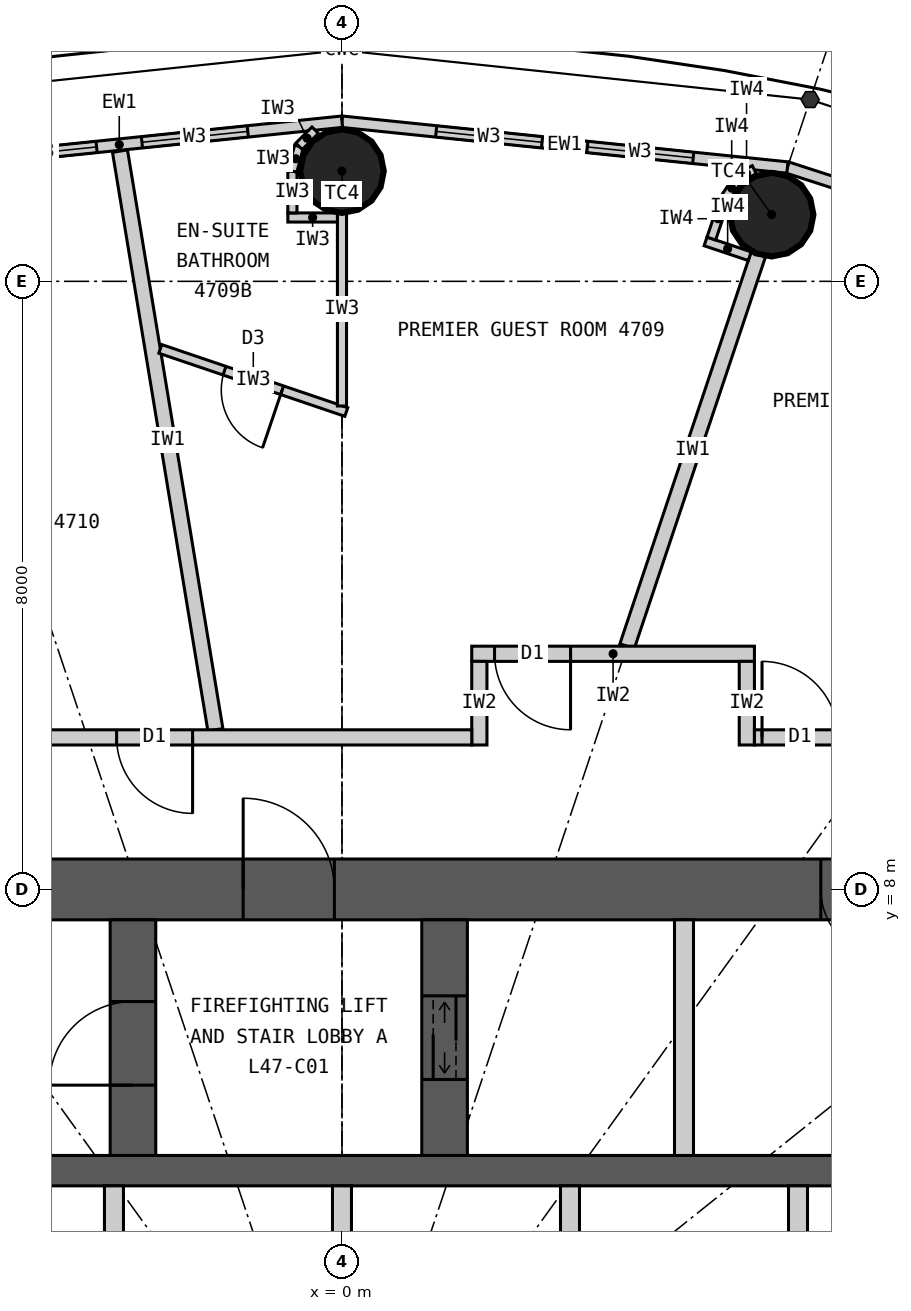
"""IFC4 building model, lengths in metres.
Left out: names, types, materials, properties, quantities, classifications, styles, units other than length and angle.
Written with IfcOpenShell. Run it as: python <this file> out.ifc"""

import sys

from ifc_helpers import new_model, si_unit, direction, frame, frame_2d, origin, origin_2d, place, context, subcontext, project, spatial, rectangle, circle, extrude, element, fill, save


model = new_model("IFC4")
c1 = context("Model", 3, precision=1e-05, world=origin(), true_north=direction((0.0, 1.0)))
c2 = subcontext(c1, "Body", "Model", "MODEL_VIEW")
j1 = project(units=[si_unit("LENGTHUNIT", "METRE"), si_unit("PLANEANGLEUNIT", "RADIAN")], contexts=[c1])
p1 = place(None, origin())
s1 = spatial("IfcSite", under=j1, at=p1, CompositionType="ELEMENT")
p2 = place(p1, origin())
s2 = spatial("IfcBuilding", under=s1, at=p2, CompositionType="ELEMENT")
p3 = place(p2, frame((0.0, 0.0, 176.4)))
s3 = spatial("IfcBuildingStorey", under=s2, at=p3, CompositionType="ELEMENT", Elevation=176.4)
for number, where, z_axis, x_axis in (
    (1, (5.653, 16.877, 0.0), (0.0, 0.0, 1.0), (1.0, 0.0, 0.0)),
    (2, (0.0, 17.45, 0.0), (0.0, 0.0, 1.0), (1.0, 0.0, 0.0)),
):
    element("IfcColumn", number, at=place(p3, frame(where, z_axis=z_axis, x_axis=x_axis)), inside=s3, PredefinedType="COLUMN", context=c2, shape_type="SweptSolid", body=[
        extrude(circle(Radius=0.55, at=origin_2d()), origin(), (0.0, 0.0, 1.0), 3.3),
    ])
p4 = place(p3, frame((-12.4, 8.0, 0.0), z_axis=(0.0, 0.0, 1.0), x_axis=(1.0, 0.0, 0.0)))
e3 = element("IfcWall", 3, at=p4, inside=s3, PredefinedType="SHEAR", context=c2, shape_type="SweptSolid", body=[
    extrude(rectangle(XDim=24.8, YDim=0.8, at=frame_2d((12.4, 0.0))), origin(), (0.0, 0.0, 1.0), 3.3),
])
p5 = place(p4, frame((11.1, 0.0, 0.0)))
e4 = element("IfcOpeningElement", 4, at=p5, cuts=e3, PredefinedType="OPENING", context=c2, shape_type="SweptSolid", body=[
    extrude(rectangle(XDim=1.2, YDim=2.2, at=frame_2d((0.6, 1.1))), frame((0.0, 0.41, 0.0), z_axis=(0.0, -1.0, 0.0), x_axis=(1.0, 0.0, 0.0)), (0.0, 0.0, 1.0), 0.82),
])
p6 = place(p4, frame((18.7, 0.0, 0.0)))
e5 = element("IfcOpeningElement", 5, at=p6, cuts=e3, PredefinedType="OPENING", context=c2, shape_type="SweptSolid", body=[
    extrude(rectangle(XDim=0.9, YDim=2.2, at=frame_2d((0.45, 1.1))), frame((0.0, 0.41, 0.0), z_axis=(0.0, -1.0, 0.0), x_axis=(1.0, 0.0, 0.0)), (0.0, 0.0, 1.0), 0.82),
])
p7 = place(p3, frame((-11.6, 4.3, 0.0), z_axis=(0.0, 0.0, 1.0), x_axis=(1.0, 0.0, 0.0)))
e6 = element("IfcWall", 6, at=p7, inside=s3, PredefinedType="SHEAR", context=c2, shape_type="SweptSolid", body=[
    extrude(rectangle(XDim=23.2, YDim=0.4, at=frame_2d((11.6, 0.0))), origin(), (0.0, 0.0, 1.0), 3.3),
])
p8 = place(p3, frame((-2.75, 4.5, 0.0), z_axis=(0.0, 0.0, 1.0), x_axis=(0.0, 1.0, 0.0)))
e7 = element("IfcWall", 7, at=p8, inside=s3, PredefinedType="SHEAR", context=c2, shape_type="SweptSolid", body=[
    extrude(rectangle(XDim=3.1, YDim=0.6, at=frame_2d((1.55, 0.0))), origin(), (0.0, 0.0, 1.0), 3.3),
])
p9 = place(p8, frame((0.925, 0.0, 0.0)))
e8 = element("IfcOpeningElement", 8, at=p9, cuts=e7, PredefinedType="OPENING", context=c2, shape_type="SweptSolid", body=[
    extrude(rectangle(XDim=1.1, YDim=2.2, at=frame_2d((0.55, 1.1))), frame((0.0, 0.31, 0.0), z_axis=(0.0, -1.0, 0.0), x_axis=(1.0, 0.0, 0.0)), (0.0, 0.0, 1.0), 0.62),
])
p10 = place(p3, frame((1.35, 4.5, 0.0), z_axis=(0.0, 0.0, 1.0), x_axis=(0.0, 1.0, 0.0)))
e9 = element("IfcWall", 9, at=p10, inside=s3, PredefinedType="SHEAR", context=c2, shape_type="SweptSolid", body=[
    extrude(rectangle(XDim=3.1, YDim=0.6, at=frame_2d((1.55, 0.0))), origin(), (0.0, 0.0, 1.0), 3.3),
])
p11 = place(p10, frame((1.0, 0.0, 0.0)))
e10 = element("IfcOpeningElement", 10, at=p11, cuts=e9, PredefinedType="OPENING", context=c2, shape_type="SweptSolid", body=[
    extrude(rectangle(XDim=1.1, YDim=2.2, at=frame_2d((0.55, 1.1))), frame((0.0, 0.31, 0.0), z_axis=(0.0, -1.0, 0.0), x_axis=(1.0, 0.0, 0.0)), (0.0, 0.0, 1.0), 0.62),
])
p12 = place(p3, frame((4.5, 4.5, 0.0), z_axis=(0.0, 0.0, 1.0), x_axis=(0.0, 1.0, 0.0)))
e11 = element("IfcWall", 11, at=p12, inside=s3, PredefinedType="PARTITIONING", context=c2, shape_type="SweptSolid", body=[
    extrude(rectangle(XDim=3.1, YDim=0.25, at=frame_2d((1.55, 0.0))), origin(), (0.0, 0.0, 1.0), 3.3),
])
for number, where, z_axis, x_axis in (
    (12, (-3.0, 1.75, 0.0), (0.0, 0.0, 1.0), (0.0, 1.0, 0.0)),
    (13, (0.0, 1.75, 0.0), (0.0, 0.0, 1.0), (0.0, 1.0, 0.0)),
    (14, (3.0, 1.75, 0.0), (0.0, 0.0, 1.0), (0.0, 1.0, 0.0)),
    (15, (6.0, 1.75, 0.0), (0.0, 0.0, 1.0), (0.0, 1.0, 0.0)),
):
    element("IfcWall", number, at=place(p3, frame(where, z_axis=z_axis, x_axis=x_axis)), inside=s3, PredefinedType="PARTITIONING", context=c2, shape_type="SweptSolid", body=[
        extrude(rectangle(XDim=2.35, YDim=0.25, at=frame_2d((1.175, 0.0))), origin(), (0.0, 0.0, 1.0), 3.3),
    ])
p13 = place(p3, frame((11.346, 15.722, 0.0), z_axis=(0.0, 0.0, 1.0), x_axis=(-0.951432482129, 0.307857486429, 0.0)))
e16 = element("IfcWall", 16, at=p13, inside=s3, PredefinedType="ELEMENTEDWALL", context=c2, shape_type="SweptSolid", body=[
    extrude(rectangle(XDim=5.766, YDim=0.15, at=frame_2d((2.883, 0.0))), origin(), (0.0, 0.0, 1.0), 3.12),
])
p14 = place(p13, frame((1.183, 0.0, 0.9)))
e17 = element("IfcOpeningElement", 17, at=p14, cuts=e16, PredefinedType="OPENING", context=c2, shape_type="SweptSolid", body=[
    extrude(rectangle(XDim=1.4, YDim=1.9, at=frame_2d((0.7, 0.95))), frame((0.0, 0.085, 0.0), z_axis=(0.0, -1.0, 0.0), x_axis=(1.0, 0.0, 0.0)), (0.0, 0.0, 1.0), 0.17),
])
p15 = place(p13, frame((3.183, 0.0, 0.9)))
e18 = element("IfcOpeningElement", 18, at=p15, cuts=e16, PredefinedType="OPENING", context=c2, shape_type="SweptSolid", body=[
    extrude(rectangle(XDim=1.4, YDim=1.9, at=frame_2d((0.7, 0.95))), frame((0.0, 0.085, 0.0), z_axis=(0.0, -1.0, 0.0), x_axis=(1.0, 0.0, 0.0)), (0.0, 0.0, 1.0), 0.17),
])
p16 = place(p3, frame((5.86, 17.497, 0.0), z_axis=(0.0, 0.0, 1.0), x_axis=(-0.994751738032, 0.102318032045, 0.0)))
e19 = element("IfcWall", 19, at=p16, inside=s3, PredefinedType="ELEMENTEDWALL", context=c2, shape_type="SweptSolid", body=[
    extrude(rectangle(XDim=5.891, YDim=0.15, at=frame_2d((2.946, 0.0))), origin(), (0.0, 0.0, 1.0), 3.12),
])
p17 = place(p16, frame((1.246, 0.0, 0.9)))
e20 = element("IfcOpeningElement", 20, at=p17, cuts=e19, PredefinedType="OPENING", context=c2, shape_type="SweptSolid", body=[
    extrude(rectangle(XDim=1.4, YDim=1.9, at=frame_2d((0.7, 0.95))), frame((0.0, 0.085, 0.0), z_axis=(0.0, -1.0, 0.0), x_axis=(1.0, 0.0, 0.0)), (0.0, 0.0, 1.0), 0.17),
])
p18 = place(p16, frame((3.246, 0.0, 0.9)))
e21 = element("IfcOpeningElement", 21, at=p18, cuts=e19, PredefinedType="OPENING", context=c2, shape_type="SweptSolid", body=[
    extrude(rectangle(XDim=1.4, YDim=1.9, at=frame_2d((0.7, 0.95))), frame((0.0, 0.085, 0.0), z_axis=(0.0, -1.0, 0.0), x_axis=(1.0, 0.0, 0.0)), (0.0, 0.0, 1.0), 0.17),
])
p19 = place(p3, frame((0.0, 18.1, 0.0), z_axis=(0.0, 0.0, 1.0), x_axis=(-0.994751738032, -0.102318032045, 0.0)))
e22 = element("IfcWall", 22, at=p19, inside=s3, PredefinedType="ELEMENTEDWALL", context=c2, shape_type="SweptSolid", body=[
    extrude(rectangle(XDim=5.891, YDim=0.15, at=frame_2d((2.946, 0.0))), origin(), (0.0, 0.0, 1.0), 3.12),
])
p20 = place(p19, frame((1.246, 0.0, 0.9)))
e23 = element("IfcOpeningElement", 23, at=p20, cuts=e22, PredefinedType="OPENING", context=c2, shape_type="SweptSolid", body=[
    extrude(rectangle(XDim=1.4, YDim=1.9, at=frame_2d((0.7, 0.95))), frame((0.0, 0.085, 0.0), z_axis=(0.0, -1.0, 0.0), x_axis=(1.0, 0.0, 0.0)), (0.0, 0.0, 1.0), 0.17),
])
p21 = place(p19, frame((3.246, 0.0, 0.9)))
e24 = element("IfcOpeningElement", 24, at=p21, cuts=e22, PredefinedType="OPENING", context=c2, shape_type="SweptSolid", body=[
    extrude(rectangle(XDim=1.4, YDim=1.9, at=frame_2d((0.7, 0.95))), frame((0.0, 0.085, 0.0), z_axis=(0.0, -1.0, 0.0), x_axis=(1.0, 0.0, 0.0)), (0.0, 0.0, 1.0), 0.17),
])
p22 = place(p3, frame((3.751, 11.2, 0.0), z_axis=(0.0, 0.0, 1.0), x_axis=(0.317614803807, 0.948219824937, 0.0)))
e25 = element("IfcWall", 25, at=p22, inside=s3, PredefinedType="PARTITIONING", context=c2, shape_type="SweptSolid", body=[
    extrude(rectangle(XDim=5.438, YDim=0.2, at=frame_2d((2.719, 0.0))), origin(), (0.0, 0.0, 1.0), 2.42),
])
p23 = place(p3, frame((-1.666, 10.1, 0.0), z_axis=(0.0, 0.0, 1.0), x_axis=(-0.162669562982, 0.986680603478, 0.0)))
e26 = element("IfcWall", 26, at=p23, inside=s3, PredefinedType="PARTITIONING", context=c2, shape_type="SweptSolid", body=[
    extrude(rectangle(XDim=7.716, YDim=0.2, at=frame_2d((3.858, 0.0))), origin(), (0.0, 0.0, 1.0), 3.12),
])
p24 = place(p3, frame((1.708, 11.1, 0.0), z_axis=(0.0, 0.0, 1.0), x_axis=(1.0, 0.0, 0.0)))
e27 = element("IfcWall", 27, at=p24, inside=s3, PredefinedType="PARTITIONING", context=c2, shape_type="SweptSolid", body=[
    extrude(rectangle(XDim=3.719, YDim=0.2, at=frame_2d((1.86, 0.0))), origin(), (0.0, 0.0, 1.0), 3.12),
])
p25 = place(p24, frame((0.3, 0.0, 0.0)))
e28 = element("IfcOpeningElement", 28, at=p25, cuts=e27, PredefinedType="OPENING", context=c2, shape_type="SweptSolid", body=[
    extrude(rectangle(XDim=1.0, YDim=2.2, at=frame_2d((0.5, 1.1))), frame((0.0, 0.11, 0.0), z_axis=(0.0, -1.0, 0.0), x_axis=(1.0, 0.0, 0.0)), (0.0, 0.0, 1.0), 0.22),
])
for number, where, z_axis, x_axis in (
    (29, (1.807, 9.9, 0.0), (0.0, 0.0, 1.0), (0.0, 1.0, 0.0)),
    (30, (5.327, 9.9, 0.0), (0.0, 0.0, 1.0), (0.0, 1.0, 0.0)),
):
    element("IfcWall", number, at=place(p3, frame(where, z_axis=z_axis, x_axis=x_axis)), inside=s3, PredefinedType="PARTITIONING", context=c2, shape_type="SweptSolid", body=[
        extrude(rectangle(XDim=1.1, YDim=0.2, at=frame_2d((0.55, 0.0))), origin(), (0.0, 0.0, 1.0), 3.12),
    ])
p26 = place(p3, frame((-2.39, 15.111, 0.0), z_axis=(0.0, 0.0, 1.0), x_axis=(0.946949953534, -0.321381059649, 0.0)))
e31 = element("IfcWall", 31, at=p26, inside=s3, PredefinedType="PARTITIONING", context=c2, shape_type="SweptSolid", body=[
    extrude(rectangle(XDim=2.584, YDim=0.12, at=frame_2d((1.292, 0.0))), origin(), (0.0, 0.0, 1.0), 3.12),
])
p27 = place(p26, frame((0.892, 0.0, 0.0)))
e32 = element("IfcOpeningElement", 32, at=p27, cuts=e31, PredefinedType="OPENING", context=c2, shape_type="SweptSolid", body=[
    extrude(rectangle(XDim=0.8, YDim=2.1, at=frame_2d((0.4, 1.05))), frame((0.0, 0.07, 0.0), z_axis=(0.0, -1.0, 0.0), x_axis=(1.0, 0.0, 0.0)), (0.0, 0.0, 1.0), 0.14),
])
p28 = place(p3, frame((0.0, 14.36, 0.0), z_axis=(0.0, 0.0, 1.0), x_axis=(0.0, 1.0, 0.0)))
e33 = element("IfcWall", 33, at=p28, inside=s3, PredefinedType="PARTITIONING", context=c2, shape_type="SweptSolid", body=[
    extrude(rectangle(XDim=2.54, YDim=0.12, at=frame_2d((1.27, 0.0))), origin(), (0.0, 0.0, 1.0), 2.42),
])
p29 = place(p3, frame((-0.06, 16.84, 0.0), z_axis=(0.0, 0.0, 1.0), x_axis=(-1.0, 0.0, 0.0)))
e34 = element("IfcWall", 34, at=p29, inside=s3, PredefinedType="PARTITIONING", context=c2, shape_type="SweptSolid", body=[
    extrude(rectangle(XDim=0.652, YDim=0.12, at=frame_2d((0.326, 0.0))), origin(), (0.0, 0.0, 1.0), 3.12),
])
p30 = place(p3, frame((-0.652, 16.9, 0.0), z_axis=(0.0, 0.0, 1.0), x_axis=(0.0, 1.0, 0.0)))
e35 = element("IfcWall", 35, at=p30, inside=s3, PredefinedType="PARTITIONING", context=c2, shape_type="SweptSolid", body=[
    extrude(rectangle(XDim=0.55, YDim=0.12, at=frame_2d((0.275, 0.0))), origin(), (0.0, 0.0, 1.0), 3.12),
])
p31 = place(p3, frame((-0.652, 17.45, 0.0), z_axis=(0.0, 0.0, 1.0), x_axis=(0.258832454679, 0.965922233104, 0.0)))
e36 = element("IfcWall", 36, at=p31, inside=s3, PredefinedType="PARTITIONING", context=c2, shape_type="SweptSolid", body=[
    extrude(rectangle(XDim=0.338, YDim=0.12, at=frame_2d((0.169, 0.0))), origin(), (0.0, 0.0, 1.0), 3.12),
])
p32 = place(p3, frame((-0.565, 17.776, 0.0), z_axis=(0.0, 0.0, 1.0), x_axis=(0.707106781187, 0.707106781187, 0.0)))
e37 = element("IfcWall", 37, at=p32, inside=s3, PredefinedType="PARTITIONING", context=c2, shape_type="SweptSolid", body=[
    extrude(rectangle(XDim=0.301, YDim=0.12, at=frame_2d((0.15, 0.0))), origin(), (0.0, 0.0, 1.0), 3.12),
])
p33 = place(p3, frame((-14.1, 10.0, 0.0), z_axis=(0.0, 0.0, 1.0), x_axis=(1.0, 0.0, 0.0)))
e38 = element("IfcWall", 38, at=p33, inside=s3, PredefinedType="PARTITIONING", context=c2, shape_type="SweptSolid", body=[
    extrude(rectangle(XDim=15.808, YDim=0.2, at=frame_2d((7.904, 0.0))), origin(), (0.0, 0.0, 1.0), 3.12),
])
p34 = place(p33, frame((11.135, 0.0, 0.0)))
e39 = element("IfcOpeningElement", 39, at=p34, cuts=e38, PredefinedType="OPENING", context=c2, shape_type="SweptSolid", body=[
    extrude(rectangle(XDim=1.0, YDim=2.2, at=frame_2d((0.5, 1.1))), frame((0.0, 0.11, 0.0), z_axis=(0.0, -1.0, 0.0), x_axis=(1.0, 0.0, 0.0)), (0.0, 0.0, 1.0), 0.22),
])
p35 = place(p33, frame((1.895, 0.0, 0.0)))
e40 = element("IfcOpeningElement", 40, at=p35, cuts=e38, PredefinedType="OPENING", context=c2, shape_type="SweptSolid", body=[
    extrude(rectangle(XDim=1.0, YDim=2.2, at=frame_2d((0.5, 1.1))), frame((0.0, 0.11, 0.0), z_axis=(0.0, -1.0, 0.0), x_axis=(1.0, 0.0, 0.0)), (0.0, 0.0, 1.0), 0.22),
])
p36 = place(p3, frame((5.427, 10.0, 0.0), z_axis=(0.0, 0.0, 1.0), x_axis=(1.0, 0.0, 0.0)))
e41 = element("IfcWall", 41, at=p36, inside=s3, PredefinedType="PARTITIONING", context=c2, shape_type="SweptSolid", body=[
    extrude(rectangle(XDim=8.673, YDim=0.2, at=frame_2d((4.337, 0.0))), origin(), (0.0, 0.0, 1.0), 3.12),
])
p37 = place(p36, frame((0.1, 0.0, 0.0)))
e42 = element("IfcOpeningElement", 42, at=p37, cuts=e41, PredefinedType="OPENING", context=c2, shape_type="SweptSolid", body=[
    extrude(rectangle(XDim=1.0, YDim=2.2, at=frame_2d((0.5, 1.1))), frame((0.0, 0.11, 0.0), z_axis=(0.0, -1.0, 0.0), x_axis=(1.0, 0.0, 0.0)), (0.0, 0.0, 1.0), 0.22),
])
p38 = place(p3, frame((5.364, 16.331, 0.0), z_axis=(0.0, 0.0, 1.0), x_axis=(-0.948283770087, 0.317423835572, 0.0)))
e43 = element("IfcWall", 43, at=p38, inside=s3, PredefinedType="PARTITIONING", context=c2, shape_type="SweptSolid", body=[
    extrude(rectangle(XDim=0.612, YDim=0.12, at=frame_2d((0.306, 0.0))), origin(), (0.0, 0.0, 1.0), 3.12),
])
p39 = place(p3, frame((4.86, 16.563, 0.0), z_axis=(0.0, 0.0, 1.0), x_axis=(0.317825321803, 0.948149284038, 0.0)))
e44 = element("IfcWall", 44, at=p39, inside=s3, PredefinedType="PARTITIONING", context=c2, shape_type="SweptSolid", body=[
    extrude(rectangle(XDim=0.55, YDim=0.12, at=frame_2d((0.275, 0.0))), origin(), (0.0, 0.0, 1.0), 3.12),
])
p40 = place(p3, frame((5.034, 17.084, 0.0), z_axis=(0.0, 0.0, 1.0), x_axis=(0.552362205726, 0.833604218851, 0.0)))
e45 = element("IfcWall", 45, at=p40, inside=s3, PredefinedType="PARTITIONING", context=c2, shape_type="SweptSolid", body=[
    extrude(rectangle(XDim=0.338, YDim=0.12, at=frame_2d((0.169, 0.0))), origin(), (0.0, 0.0, 1.0), 3.12),
])
p41 = place(p3, frame((5.221, 17.366, 0.0), z_axis=(0.0, 0.0, 1.0), x_axis=(0.895067896179, 0.445929883759, 0.0)))
e46 = element("IfcWall", 46, at=p41, inside=s3, PredefinedType="PARTITIONING", context=c2, shape_type="SweptSolid", body=[
    extrude(rectangle(XDim=0.228, YDim=0.12, at=frame_2d((0.114, 0.0))), origin(), (0.0, 0.0, 1.0), 3.12),
])
p42 = place(p17, origin())
e47 = element("IfcWindow", 47, at=p42, inside=s3, PartitioningType="SINGLE_PANEL", PredefinedType="WINDOW", context=c2, shape_type="SweptSolid", body=[
    extrude(rectangle(XDim=1.4, YDim=1.9, at=frame_2d((0.7, 0.95))), frame((0.0, 0.03, 0.0), z_axis=(0.0, -1.0, 0.0), x_axis=(1.0, 0.0, 0.0)), (0.0, 0.0, 1.0), 0.06),
])
fill(e20, e47)
p43 = place(p18, origin())
e48 = element("IfcWindow", 48, at=p43, inside=s3, PartitioningType="SINGLE_PANEL", PredefinedType="WINDOW", context=c2, shape_type="SweptSolid", body=[
    extrude(rectangle(XDim=1.4, YDim=1.9, at=frame_2d((0.7, 0.95))), frame((0.0, 0.03, 0.0), z_axis=(0.0, -1.0, 0.0), x_axis=(1.0, 0.0, 0.0)), (0.0, 0.0, 1.0), 0.06),
])
fill(e21, e48)
p44 = place(p20, origin())
e49 = element("IfcWindow", 49, at=p44, inside=s3, PartitioningType="SINGLE_PANEL", PredefinedType="WINDOW", context=c2, shape_type="SweptSolid", body=[
    extrude(rectangle(XDim=1.4, YDim=1.9, at=frame_2d((0.7, 0.95))), frame((0.0, 0.03, 0.0), z_axis=(0.0, -1.0, 0.0), x_axis=(1.0, 0.0, 0.0)), (0.0, 0.0, 1.0), 0.06),
])
fill(e23, e49)
p45 = place(p21, origin())
e50 = element("IfcWindow", 50, at=p45, inside=s3, PartitioningType="SINGLE_PANEL", PredefinedType="WINDOW", context=c2, shape_type="SweptSolid", body=[
    extrude(rectangle(XDim=1.4, YDim=1.9, at=frame_2d((0.7, 0.95))), frame((0.0, 0.03, 0.0), z_axis=(0.0, -1.0, 0.0), x_axis=(1.0, 0.0, 0.0)), (0.0, 0.0, 1.0), 0.06),
])
fill(e24, e50)
p46 = place(p37, origin())
e51 = element("IfcDoor", 51, at=p46, inside=s3, OperationType="SINGLE_SWING_LEFT", PredefinedType="DOOR", context=c2, shape_type="SweptSolid", body=[
    extrude(rectangle(XDim=1.0, YDim=2.2, at=frame_2d((0.5, 1.1))), frame((0.0, 0.025, 0.0), z_axis=(0.0, -1.0, 0.0), x_axis=(1.0, 0.0, 0.0)), (0.0, 0.0, 1.0), 0.05),
])
fill(e42, e51)
p47 = place(p27, origin())
e52 = element("IfcDoor", 52, at=p47, inside=s3, OperationType="SINGLE_SWING_RIGHT", PredefinedType="DOOR", context=c2, shape_type="SweptSolid", body=[
    extrude(rectangle(XDim=0.8, YDim=2.1, at=frame_2d((0.4, 1.05))), frame((0.0, 0.025, 0.0), z_axis=(0.0, -1.0, 0.0), x_axis=(1.0, 0.0, 0.0)), (0.0, 0.0, 1.0), 0.05),
])
fill(e32, e52)
p48 = place(p25, origin())
e53 = element("IfcDoor", 53, at=p48, inside=s3, OperationType="SINGLE_SWING_RIGHT", PredefinedType="DOOR", context=c2, shape_type="SweptSolid", body=[
    extrude(rectangle(XDim=1.0, YDim=2.2, at=frame_2d((0.5, 1.1))), frame((0.0, 0.025, 0.0), z_axis=(0.0, -1.0, 0.0), x_axis=(1.0, 0.0, 0.0)), (0.0, 0.0, 1.0), 0.05),
])
fill(e28, e53)
p49 = place(p34, origin())
e54 = element("IfcDoor", 54, at=p49, inside=s3, OperationType="SINGLE_SWING_RIGHT", PredefinedType="DOOR", context=c2, shape_type="SweptSolid", body=[
    extrude(rectangle(XDim=1.0, YDim=2.2, at=frame_2d((0.5, 1.1))), frame((0.0, 0.025, 0.0), z_axis=(0.0, -1.0, 0.0), x_axis=(1.0, 0.0, 0.0)), (0.0, 0.0, 1.0), 0.05),
])
fill(e39, e54)
p50 = place(p5, origin())
e55 = element("IfcDoor", 55, at=p50, inside=s3, OperationType="SINGLE_SWING_LEFT", PredefinedType="DOOR", context=c2, shape_type="SweptSolid", body=[
    extrude(rectangle(XDim=1.2, YDim=2.2, at=frame_2d((0.6, 1.1))), frame((0.0, 0.025, 0.0), z_axis=(0.0, -1.0, 0.0), x_axis=(1.0, 0.0, 0.0)), (0.0, 0.0, 1.0), 0.05),
])
fill(e4, e55)
p51 = place(p9, origin())
e56 = element("IfcDoor", 56, at=p51, inside=s3, OperationType="SINGLE_SWING_LEFT", PredefinedType="DOOR", context=c2, shape_type="SweptSolid", body=[
    extrude(rectangle(XDim=1.1, YDim=2.2, at=frame_2d((0.55, 1.1))), frame((0.0, 0.025, 0.0), z_axis=(0.0, -1.0, 0.0), x_axis=(1.0, 0.0, 0.0)), (0.0, 0.0, 1.0), 0.05),
])
fill(e8, e56)
p52 = place(p11, origin())
e57 = element("IfcDoor", 57, at=p52, inside=s3, OperationType="DOUBLE_DOOR_SLIDING", PredefinedType="DOOR", context=c2, shape_type="SweptSolid", body=[
    extrude(rectangle(XDim=1.1, YDim=2.2, at=frame_2d((0.55, 1.1))), frame((0.0, 0.025, 0.0), z_axis=(0.0, -1.0, 0.0), x_axis=(1.0, 0.0, 0.0)), (0.0, 0.0, 1.0), 0.05),
])
fill(e10, e57)
p53 = place(p6, origin())
e58 = element("IfcDoor", 58, at=p53, inside=s3, OperationType="SINGLE_SWING_RIGHT", PredefinedType="DOOR", context=c2, shape_type="SweptSolid", body=[
    extrude(rectangle(XDim=0.9, YDim=2.2, at=frame_2d((0.45, 1.1))), frame((0.0, 0.025, 0.0), z_axis=(0.0, -1.0, 0.0), x_axis=(1.0, 0.0, 0.0)), (0.0, 0.0, 1.0), 0.05),
])
fill(e5, e58)
save(model, sys.argv[1])
